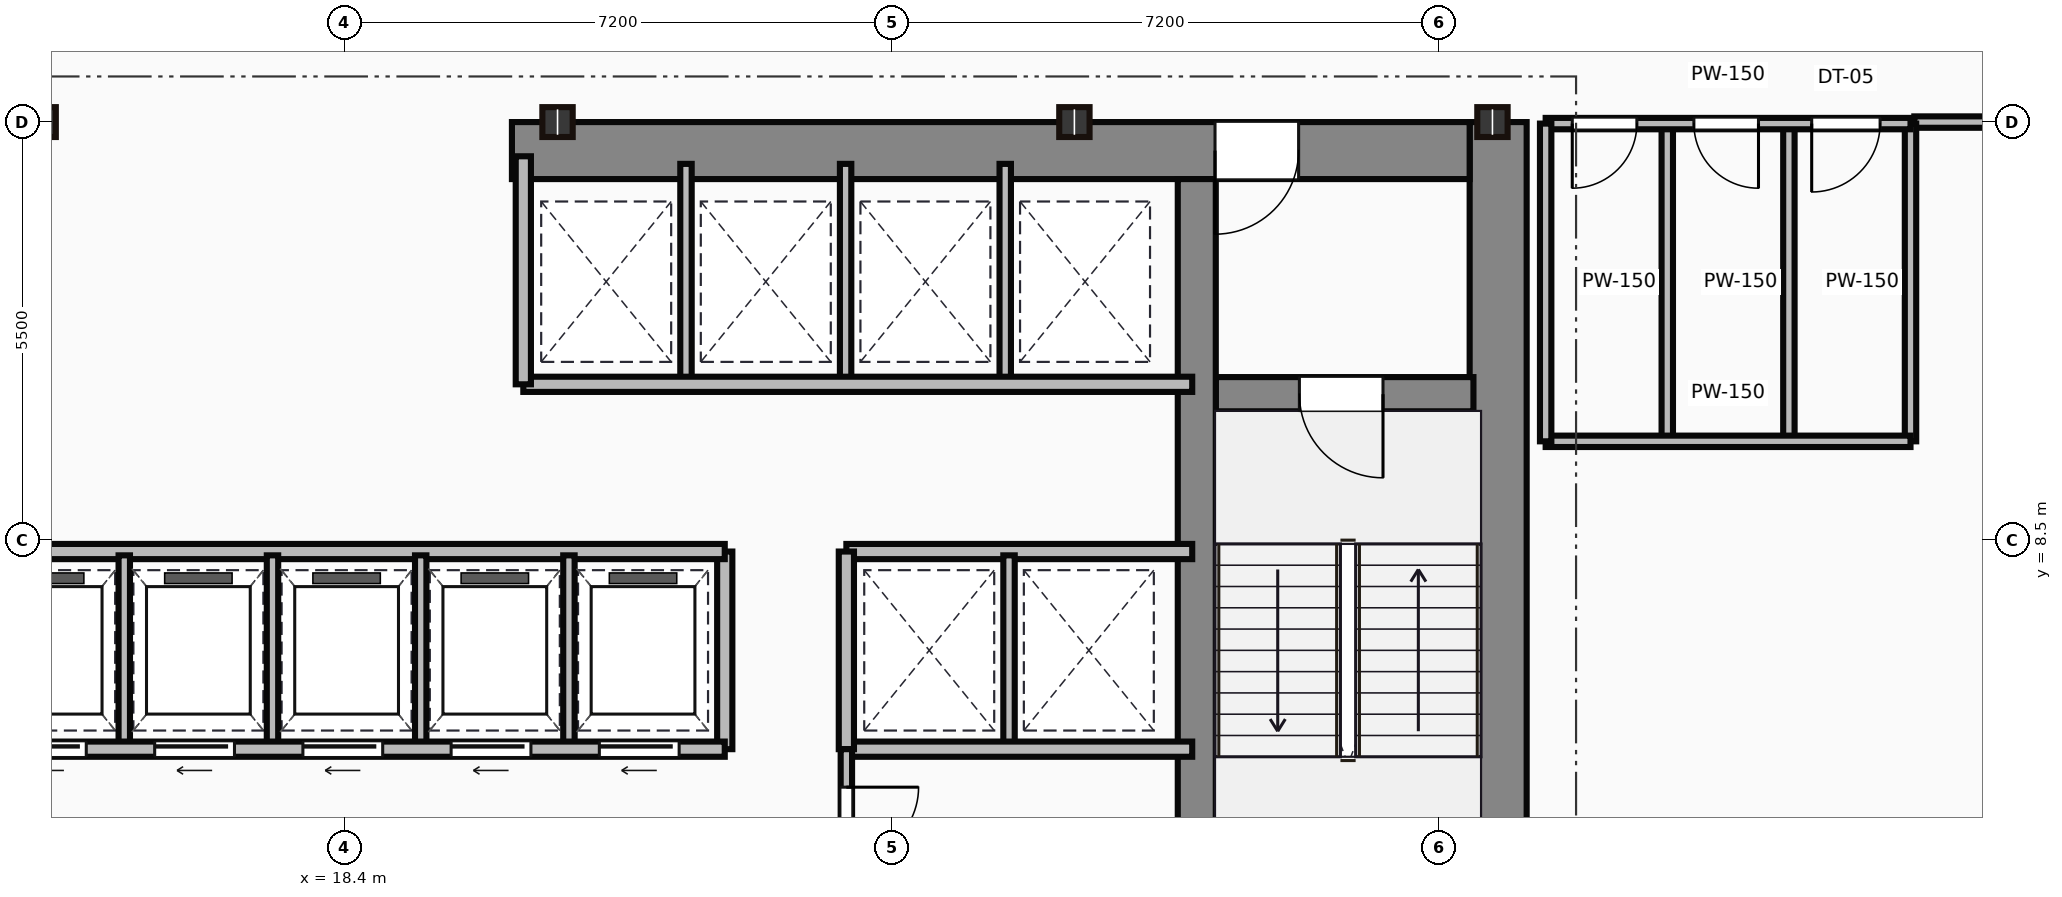
"""IFC4 building model, lengths in metres.
Left out: names, types, materials, properties, quantities, classifications, styles, units other than length and angle.
Written with IfcOpenShell. Run it as: python <this file> out.ifc"""

import sys

from ifc_helpers import new_model, si_unit, direction, frame, frame_2d, origin, origin_2d, place, context, subcontext, project, spatial, rectangle, i_section, extrude, source, transform, mapped, element, fill, save


model = new_model("IFC4")
c1 = context("Model", 3, precision=1e-05, world=origin(), true_north=direction((0.0, 1.0)))
c2 = subcontext(c1, "Body", "Model", "MODEL_VIEW")
j1 = project(units=[si_unit("LENGTHUNIT", "METRE"), si_unit("PLANEANGLEUNIT", "RADIAN")], contexts=[c1])
p1 = place(None, origin())
s1 = spatial("IfcSite", under=j1, at=p1, CompositionType="ELEMENT")
p2 = place(p1, origin())
s2 = spatial("IfcBuilding", under=s1, at=p2, CompositionType="ELEMENT")
p3 = place(p2, frame((0.0, 0.0, 110.55)))
s3 = spatial("IfcBuildingStorey", under=s2, at=p3, CompositionType="ELEMENT", Elevation=110.55)
m1 = source(origin(), c2, "Body", "SweptSolid", [
    extrude(rectangle(XDim=13.1, YDim=0.75, at=frame_2d((6.55, 0.0))), origin(), (0.0, 0.0, 1.0), 3.65),
])
p4 = place(p3, frame((33.575, 0.9, 0.0), z_axis=(0.0, 0.0, 1.0), x_axis=(0.0, 1.0, 0.0)))
e1 = element("IfcWall", 1, at=p4, inside=s3, PredefinedType="SHEAR", context=c2, shape_type="MappedRepresentation", body=[
    mapped(m1, transform((0.0, 0.0, 0.0))),
])
m2 = source(origin(), c2, "Body", "SweptSolid", [
    extrude(rectangle(XDim=12.6, YDim=0.75, at=frame_2d((6.3, 0.0))), origin(), (0.0, 0.0, 1.0), 3.65),
])
p5 = place(p3, frame((20.6, 13.625, 0.0), z_axis=(0.0, 0.0, 1.0), x_axis=(1.0, 0.0, 0.0)))
e2 = element("IfcWall", 2, at=p5, inside=s3, PredefinedType="SHEAR", context=c2, shape_type="MappedRepresentation", body=[
    mapped(m2, transform((0.0, 0.0, 0.0))),
])
p6 = place(p5, frame((9.25, 0.0, 0.0)))
e3 = element("IfcOpeningElement", 3, at=p6, cuts=e2, PredefinedType="OPENING", context=c2, shape_type="SweptSolid", body=[
    extrude(rectangle(XDim=1.1, YDim=2.15, at=frame_2d((0.55, 1.075))), frame((0.0, 0.385, 0.0), z_axis=(0.0, -1.0, 0.0), x_axis=(1.0, 0.0, 0.0)), (0.0, 0.0, 1.0), 0.77),
])
m3 = source(origin(), c2, "Body", "SweptSolid", [
    extrude(rectangle(XDim=12.35, YDim=0.5, at=frame_2d((6.175, 0.0))), origin(), (0.0, 0.0, 1.0), 3.65),
])
p7 = place(p3, frame((29.61, 0.9, 0.0), z_axis=(0.0, 0.0, 1.0), x_axis=(0.0, 1.0, 0.0)))
e4 = element("IfcWall", 4, at=p7, inside=s3, PredefinedType="SHEAR", context=c2, shape_type="MappedRepresentation", body=[
    mapped(m3, transform((0.0, 0.0, 0.0))),
])
m4 = source(origin(), c2, "Body", "SweptSolid", [
    extrude(rectangle(XDim=3.39, YDim=0.45, at=frame_2d((1.695, 0.0))), origin(), (0.0, 0.0, 1.0), 3.65),
])
p8 = place(p3, frame((29.86, 10.42, 0.0), z_axis=(0.0, 0.0, 1.0), x_axis=(1.0, 0.0, 0.0)))
e5 = element("IfcWall", 5, at=p8, inside=s3, PredefinedType="SHEAR", context=c2, shape_type="MappedRepresentation", body=[
    mapped(m4, transform((0.0, 0.0, 0.0))),
])
p9 = place(p8, frame((1.1, 0.0, 0.0)))
e6 = element("IfcOpeningElement", 6, at=p9, cuts=e5, PredefinedType="OPENING", context=c2, shape_type="SweptSolid", body=[
    extrude(rectangle(XDim=1.1, YDim=2.15, at=frame_2d((0.55, 1.075))), frame((0.0, 0.235, 0.0), z_axis=(0.0, -1.0, 0.0), x_axis=(1.0, 0.0, 0.0)), (0.0, 0.0, 1.0), 0.47),
])
m5 = source(origin(), c2, "Body", "SweptSolid", [
    extrude(i_section(OverallWidth=0.399, OverallDepth=0.393, WebThickness=0.023, FlangeThickness=0.037, at=origin_2d()), origin(), (0.0, 0.0, 1.0), 3.65),
])
for number, where, z_axis, x_axis in (
    (7, (14.4, 14.0, 0.0), (0.0, 0.0, 1.0), (1.0, 0.0, 0.0)),
    (8, (21.2, 14.0, 0.0), (0.0, 0.0, 1.0), (1.0, 0.0, 0.0)),
    (9, (28.0, 14.0, 0.0), (0.0, 0.0, 1.0), (1.0, 0.0, 0.0)),
    (10, (33.5, 14.0, 0.0), (0.0, 0.0, 1.0), (1.0, 0.0, 0.0)),
):
    element("IfcColumn", number, at=place(p3, frame(where, z_axis=z_axis, x_axis=x_axis)), inside=s3, PredefinedType="COLUMN", context=c2, shape_type="MappedRepresentation", body=[
        mapped(m5, transform((0.0, 0.0, 0.0))),
    ])
m6 = source(origin(), c2, "Body", "SweptSolid", [
    extrude(rectangle(XDim=11.85, YDim=0.2, at=frame_2d((5.925, 0.0))), origin(), (0.0, 0.0, 1.0), 3.4),
])
p10 = place(p3, frame((11.55, 5.75, 0.0), z_axis=(0.0, 0.0, 1.0), x_axis=(1.0, 0.0, 0.0)))
e11 = element("IfcWall", 11, at=p10, inside=s3, PredefinedType="PARTITIONING", context=c2, shape_type="MappedRepresentation", body=[
    mapped(m6, transform((0.0, 0.0, 0.0))),
])
p11 = place(p10, frame((0.45, 0.0, 0.0)))
e12 = element("IfcOpeningElement", 12, at=p11, cuts=e11, PredefinedType="OPENING", context=c2, shape_type="SweptSolid", body=[
    extrude(rectangle(XDim=1.05, YDim=2.15, at=frame_2d((0.525, 1.075))), frame((0.0, 0.11, 0.0), z_axis=(0.0, -1.0, 0.0), x_axis=(1.0, 0.0, 0.0)), (0.0, 0.0, 1.0), 0.22),
])
p12 = place(p10, frame((2.4, 0.0, 0.0)))
e13 = element("IfcOpeningElement", 13, at=p12, cuts=e11, PredefinedType="OPENING", context=c2, shape_type="SweptSolid", body=[
    extrude(rectangle(XDim=1.05, YDim=2.15, at=frame_2d((0.525, 1.075))), frame((0.0, 0.11, 0.0), z_axis=(0.0, -1.0, 0.0), x_axis=(1.0, 0.0, 0.0)), (0.0, 0.0, 1.0), 0.22),
])
p13 = place(p10, frame((4.35, 0.0, 0.0)))
e14 = element("IfcOpeningElement", 14, at=p13, cuts=e11, PredefinedType="OPENING", context=c2, shape_type="SweptSolid", body=[
    extrude(rectangle(XDim=1.05, YDim=2.15, at=frame_2d((0.525, 1.075))), frame((0.0, 0.11, 0.0), z_axis=(0.0, -1.0, 0.0), x_axis=(1.0, 0.0, 0.0)), (0.0, 0.0, 1.0), 0.22),
])
p14 = place(p10, frame((6.3, 0.0, 0.0)))
e15 = element("IfcOpeningElement", 15, at=p14, cuts=e11, PredefinedType="OPENING", context=c2, shape_type="SweptSolid", body=[
    extrude(rectangle(XDim=1.05, YDim=2.15, at=frame_2d((0.525, 1.075))), frame((0.0, 0.11, 0.0), z_axis=(0.0, -1.0, 0.0), x_axis=(1.0, 0.0, 0.0)), (0.0, 0.0, 1.0), 0.22),
])
p15 = place(p10, frame((8.25, 0.0, 0.0)))
e16 = element("IfcOpeningElement", 16, at=p15, cuts=e11, PredefinedType="OPENING", context=c2, shape_type="SweptSolid", body=[
    extrude(rectangle(XDim=1.05, YDim=2.15, at=frame_2d((0.525, 1.075))), frame((0.0, 0.11, 0.0), z_axis=(0.0, -1.0, 0.0), x_axis=(1.0, 0.0, 0.0)), (0.0, 0.0, 1.0), 0.22),
])
p16 = place(p10, frame((10.2, 0.0, 0.0)))
e17 = element("IfcOpeningElement", 17, at=p16, cuts=e11, PredefinedType="OPENING", context=c2, shape_type="SweptSolid", body=[
    extrude(rectangle(XDim=1.05, YDim=2.15, at=frame_2d((0.525, 1.075))), frame((0.0, 0.11, 0.0), z_axis=(0.0, -1.0, 0.0), x_axis=(1.0, 0.0, 0.0)), (0.0, 0.0, 1.0), 0.22),
])
p17 = place(p3, frame((11.55, 8.35, 0.0), z_axis=(0.0, 0.0, 1.0), x_axis=(1.0, 0.0, 0.0)))
e18 = element("IfcWall", 18, at=p17, inside=s3, PredefinedType="PARTITIONING", context=c2, shape_type="MappedRepresentation", body=[
    mapped(m6, transform((0.0, 0.0, 0.0))),
])
m7 = source(origin(), c2, "Body", "SweptSolid", [
    extrude(rectangle(XDim=2.6, YDim=0.2, at=frame_2d((1.3, 0.0))), origin(), (0.0, 0.0, 1.0), 3.4),
])
p18 = place(p3, frame((23.4, 5.75, 0.0), z_axis=(0.0, 0.0, 1.0), x_axis=(0.0, 1.0, 0.0)))
e19 = element("IfcWall", 19, at=p18, inside=s3, PredefinedType="PARTITIONING", context=c2, shape_type="MappedRepresentation", body=[
    mapped(m7, transform((0.0, 0.0, 0.0))),
])
m8 = source(origin(), c2, "Body", "SweptSolid", [
    extrude(rectangle(XDim=2.5, YDim=0.15, at=frame_2d((1.25, 0.0))), origin(), (0.0, 0.0, 1.0), 3.4),
])
for number, where, z_axis, x_axis in (
    (20, (15.5, 5.8, 0.0), (0.0, 0.0, 1.0), (0.0, 1.0, 0.0)),
    (21, (17.45, 5.8, 0.0), (0.0, 0.0, 1.0), (0.0, 1.0, 0.0)),
    (22, (19.4, 5.8, 0.0), (0.0, 0.0, 1.0), (0.0, 1.0, 0.0)),
    (23, (21.35, 5.8, 0.0), (0.0, 0.0, 1.0), (0.0, 1.0, 0.0)),
):
    element("IfcWall", number, at=place(p3, frame(where, z_axis=z_axis, x_axis=x_axis)), inside=s3, PredefinedType="PARTITIONING", context=c2, shape_type="MappedRepresentation", body=[
        mapped(m8, transform((0.0, 0.0, 0.0))),
    ])
m9 = source(origin(), c2, "Body", "SweptSolid", [
    extrude(rectangle(XDim=8.8, YDim=0.2, at=frame_2d((4.4, 0.0))), origin(), (0.0, 0.0, 1.0), 3.4),
])
p19 = place(p3, frame((20.75, 10.55, 0.0), z_axis=(0.0, 0.0, 1.0), x_axis=(1.0, 0.0, 0.0)))
e24 = element("IfcWall", 24, at=p19, inside=s3, PredefinedType="PARTITIONING", context=c2, shape_type="MappedRepresentation", body=[
    mapped(m9, transform((0.0, 0.0, 0.0))),
])
m10 = source(origin(), c2, "Body", "SweptSolid", [
    extrude(rectangle(XDim=3.0, YDim=0.2, at=frame_2d((1.5, 0.0))), origin(), (0.0, 0.0, 1.0), 3.4),
])
p20 = place(p3, frame((20.75, 10.55, 0.0), z_axis=(0.0, 0.0, 1.0), x_axis=(0.0, 1.0, 0.0)))
e25 = element("IfcWall", 25, at=p20, inside=s3, PredefinedType="PARTITIONING", context=c2, shape_type="MappedRepresentation", body=[
    mapped(m10, transform((0.0, 0.0, 0.0))),
])
m11 = source(origin(), c2, "Body", "SweptSolid", [
    extrude(rectangle(XDim=2.85, YDim=0.15, at=frame_2d((1.425, 0.0))), origin(), (0.0, 0.0, 1.0), 3.4),
])
for number, where, z_axis, x_axis in (
    (26, (22.89, 10.6, 0.0), (0.0, 0.0, 1.0), (0.0, 1.0, 0.0)),
    (27, (24.99, 10.6, 0.0), (0.0, 0.0, 1.0), (0.0, 1.0, 0.0)),
    (28, (27.09, 10.6, 0.0), (0.0, 0.0, 1.0), (0.0, 1.0, 0.0)),
):
    element("IfcWall", number, at=place(p3, frame(where, z_axis=z_axis, x_axis=x_axis)), inside=s3, PredefinedType="PARTITIONING", context=c2, shape_type="MappedRepresentation", body=[
        mapped(m11, transform((0.0, 0.0, 0.0))),
    ])
m12 = source(origin(), c2, "Body", "SweptSolid", [
    extrude(rectangle(XDim=4.55, YDim=0.2, at=frame_2d((2.275, 0.0))), origin(), (0.0, 0.0, 1.0), 3.4),
])
for number, where, z_axis, x_axis in (
    (29, (25.0, 8.35, 0.0), (0.0, 0.0, 1.0), (1.0, 0.0, 0.0)),
    (30, (25.0, 5.75, 0.0), (0.0, 0.0, 1.0), (1.0, 0.0, 0.0)),
):
    element("IfcWall", number, at=place(p3, frame(where, z_axis=z_axis, x_axis=x_axis)), inside=s3, PredefinedType="PARTITIONING", context=c2, shape_type="MappedRepresentation", body=[
        mapped(m12, transform((0.0, 0.0, 0.0))),
    ])
p21 = place(p3, frame((25.0, 5.75, 0.0), z_axis=(0.0, 0.0, 1.0), x_axis=(0.0, 1.0, 0.0)))
e31 = element("IfcWall", 31, at=p21, inside=s3, PredefinedType="PARTITIONING", context=c2, shape_type="MappedRepresentation", body=[
    mapped(m7, transform((0.0, 0.0, 0.0))),
])
p22 = place(p3, frame((27.14, 5.8, 0.0), z_axis=(0.0, 0.0, 1.0), x_axis=(0.0, 1.0, 0.0)))
e32 = element("IfcWall", 32, at=p22, inside=s3, PredefinedType="PARTITIONING", context=c2, shape_type="MappedRepresentation", body=[
    mapped(m8, transform((0.0, 0.0, 0.0))),
])
m13 = source(origin(), c2, "Body", "SweptSolid", [
    extrude(rectangle(XDim=4.9, YDim=0.15, at=frame_2d((2.45, 0.0))), origin(), (0.0, 0.0, 1.0), 3.4),
])
p23 = place(p3, frame((25.0, 0.85, 0.0), z_axis=(0.0, 0.0, 1.0), x_axis=(0.0, 1.0, 0.0)))
e33 = element("IfcWall", 33, at=p23, inside=s3, PredefinedType="PARTITIONING", context=c2, shape_type="MappedRepresentation", body=[
    mapped(m13, transform((0.0, 0.0, 0.0))),
])
p24 = place(p23, frame((1.8, 0.0, 0.0)))
e34 = element("IfcOpeningElement", 34, at=p24, cuts=e33, PredefinedType="OPENING", context=c2, shape_type="SweptSolid", body=[
    extrude(rectangle(XDim=0.95, YDim=2.15, at=frame_2d((0.475, 1.075))), frame((0.0, 0.085, 0.0), z_axis=(0.0, -1.0, 0.0), x_axis=(1.0, 0.0, 0.0)), (0.0, 0.0, 1.0), 0.17),
])
p25 = place(p23, frame((3.45, 0.0, 0.0)))
e35 = element("IfcOpeningElement", 35, at=p25, cuts=e33, PredefinedType="OPENING", context=c2, shape_type="SweptSolid", body=[
    extrude(rectangle(XDim=0.95, YDim=2.15, at=frame_2d((0.475, 1.075))), frame((0.0, 0.085, 0.0), z_axis=(0.0, -1.0, 0.0), x_axis=(1.0, 0.0, 0.0)), (0.0, 0.0, 1.0), 0.17),
])
m14 = source(origin(), c2, "Body", "SweptSolid", [
    extrude(rectangle(XDim=4.8, YDim=0.15, at=frame_2d((2.4, 0.0))), origin(), (0.0, 0.0, 1.0), 2.702),
])
p26 = place(p3, frame((34.2, 13.98, 0.0), z_axis=(0.0, 0.0, 1.0), x_axis=(1.0, 0.0, 0.0)))
e36 = element("IfcWall", 36, at=p26, inside=s3, PredefinedType="PARTITIONING", context=c2, shape_type="MappedRepresentation", body=[
    mapped(m14, transform((0.0, 0.0, 0.0))),
])
p27 = place(p26, frame((0.35, 0.0, 0.0)))
e37 = element("IfcOpeningElement", 37, at=p27, cuts=e36, PredefinedType="OPENING", context=c2, shape_type="SweptSolid", body=[
    extrude(rectangle(XDim=0.85, YDim=2.1, at=frame_2d((0.425, 1.05))), frame((0.0, 0.085, 0.0), z_axis=(0.0, -1.0, 0.0), x_axis=(1.0, 0.0, 0.0)), (0.0, 0.0, 1.0), 0.17),
])
p28 = place(p26, frame((1.95, 0.0, 0.0)))
e38 = element("IfcOpeningElement", 38, at=p28, cuts=e36, PredefinedType="OPENING", context=c2, shape_type="SweptSolid", body=[
    extrude(rectangle(XDim=0.85, YDim=2.1, at=frame_2d((0.425, 1.05))), frame((0.0, 0.085, 0.0), z_axis=(0.0, -1.0, 0.0), x_axis=(1.0, 0.0, 0.0)), (0.0, 0.0, 1.0), 0.17),
])
p29 = place(p26, frame((3.5, 0.0, 0.0)))
e39 = element("IfcOpeningElement", 39, at=p29, cuts=e36, PredefinedType="OPENING", context=c2, shape_type="SweptSolid", body=[
    extrude(rectangle(XDim=0.9, YDim=2.1, at=frame_2d((0.45, 1.05))), frame((0.0, 0.085, 0.0), z_axis=(0.0, -1.0, 0.0), x_axis=(1.0, 0.0, 0.0)), (0.0, 0.0, 1.0), 0.17),
])
m15 = source(origin(), c2, "Body", "SweptSolid", [
    extrude(rectangle(XDim=4.8, YDim=0.15, at=frame_2d((2.4, 0.0))), origin(), (0.0, 0.0, 1.0), 3.4),
])
p30 = place(p3, frame((34.2, 9.8, 0.0), z_axis=(0.0, 0.0, 1.0), x_axis=(1.0, 0.0, 0.0)))
e40 = element("IfcWall", 40, at=p30, inside=s3, PredefinedType="PARTITIONING", context=c2, shape_type="MappedRepresentation", body=[
    mapped(m15, transform((0.0, 0.0, 0.0))),
])
m16 = source(origin(), c2, "Body", "SweptSolid", [
    extrude(rectangle(XDim=4.18, YDim=0.15, at=frame_2d((2.09, 0.0))), origin(), (0.0, 0.0, 1.0), 3.4),
])
for number, where, z_axis, x_axis in (
    (41, (39.0, 9.8, 0.0), (0.0, 0.0, 1.0), (0.0, 1.0, 0.0)),
    (42, (34.2, 9.8, 0.0), (0.0, 0.0, 1.0), (0.0, 1.0, 0.0)),
    (43, (35.8, 9.8, 0.0), (0.0, 0.0, 1.0), (0.0, 1.0, 0.0)),
    (44, (37.4, 9.8, 0.0), (0.0, 0.0, 1.0), (0.0, 1.0, 0.0)),
):
    element("IfcWall", number, at=place(p3, frame(where, z_axis=z_axis, x_axis=x_axis)), inside=s3, PredefinedType="PARTITIONING", context=c2, shape_type="MappedRepresentation", body=[
        mapped(m16, transform((0.0, 0.0, 0.0))),
    ])
m17 = source(origin(), c2, "Body", "SweptSolid", [
    extrude(rectangle(XDim=1.75, YDim=0.15, at=frame_2d((0.875, 0.0))), origin(), (0.0, 0.0, 1.0), 2.702),
])
p31 = place(p3, frame((40.8, 14.0, 0.0), z_axis=(0.0, 0.0, 1.0), x_axis=(-1.0, 0.0, 0.0)))
e45 = element("IfcWall", 45, at=p31, inside=s3, PredefinedType="PARTITIONING", context=c2, shape_type="MappedRepresentation", body=[
    mapped(m17, transform((0.0, 0.0, 0.0))),
])
m18 = source(origin(), c2, "Body", "SweptSolid", [
    extrude(rectangle(XDim=1.1, YDim=2.15, at=frame_2d((0.55, 1.075))), frame((0.0, 0.025, 0.0), z_axis=(0.0, -1.0, 0.0), x_axis=(1.0, 0.0, 0.0)), (0.0, 0.0, 1.0), 0.05),
])
p32 = place(p9, frame((1.1, 0.0, 0.0), z_axis=(0.0, 0.0, 1.0), x_axis=(-1.0, 0.0, 0.0)))
e46 = element("IfcDoor", 46, at=p32, inside=s3, OperationType="SINGLE_SWING_RIGHT", PredefinedType="DOOR", context=c2, shape_type="MappedRepresentation", body=[
    mapped(m18, transform((0.0, 0.0, 0.0))),
])
fill(e6, e46)
p33 = place(p6, origin())
e47 = element("IfcDoor", 47, at=p33, inside=s3, OperationType="SINGLE_SWING_LEFT", PredefinedType="DOOR", context=c2, shape_type="MappedRepresentation", body=[
    mapped(m18, transform((0.0, 0.0, 0.0))),
])
fill(e3, e47)
m19 = source(origin(), c2, "Body", "SweptSolid", [
    extrude(rectangle(XDim=1.05, YDim=2.15, at=frame_2d((0.525, 1.075))), frame((0.0, 0.025, 0.0), z_axis=(0.0, -1.0, 0.0), x_axis=(1.0, 0.0, 0.0)), (0.0, 0.0, 1.0), 0.05),
])
p34 = place(p12, frame((1.05, 0.0, 0.0), z_axis=(0.0, 0.0, 1.0), x_axis=(-1.0, 0.0, 0.0)))
e48 = element("IfcDoor", 48, at=p34, inside=s3, OperationType="SLIDING_TO_LEFT", PredefinedType="DOOR", context=c2, shape_type="MappedRepresentation", body=[
    mapped(m19, transform((0.0, 0.0, 0.0))),
])
fill(e13, e48)
p35 = place(p13, frame((1.05, 0.0, 0.0), z_axis=(0.0, 0.0, 1.0), x_axis=(-1.0, 0.0, 0.0)))
e49 = element("IfcDoor", 49, at=p35, inside=s3, OperationType="SLIDING_TO_LEFT", PredefinedType="DOOR", context=c2, shape_type="MappedRepresentation", body=[
    mapped(m19, transform((0.0, 0.0, 0.0))),
])
fill(e14, e49)
p36 = place(p14, frame((1.05, 0.0, 0.0), z_axis=(0.0, 0.0, 1.0), x_axis=(-1.0, 0.0, 0.0)))
e50 = element("IfcDoor", 50, at=p36, inside=s3, OperationType="SLIDING_TO_LEFT", PredefinedType="DOOR", context=c2, shape_type="MappedRepresentation", body=[
    mapped(m19, transform((0.0, 0.0, 0.0))),
])
fill(e15, e50)
p37 = place(p15, frame((1.05, 0.0, 0.0), z_axis=(0.0, 0.0, 1.0), x_axis=(-1.0, 0.0, 0.0)))
e51 = element("IfcDoor", 51, at=p37, inside=s3, OperationType="SLIDING_TO_LEFT", PredefinedType="DOOR", context=c2, shape_type="MappedRepresentation", body=[
    mapped(m19, transform((0.0, 0.0, 0.0))),
])
fill(e16, e51)
p38 = place(p16, frame((1.05, 0.0, 0.0), z_axis=(0.0, 0.0, 1.0), x_axis=(-1.0, 0.0, 0.0)))
e52 = element("IfcDoor", 52, at=p38, inside=s3, OperationType="SLIDING_TO_LEFT", PredefinedType="DOOR", context=c2, shape_type="MappedRepresentation", body=[
    mapped(m19, transform((0.0, 0.0, 0.0))),
])
fill(e17, e52)
m20 = source(origin(), c2, "Body", "SweptSolid", [
    extrude(rectangle(XDim=0.95, YDim=2.15, at=frame_2d((0.475, 1.075))), frame((0.0, 0.025, 0.0), z_axis=(0.0, -1.0, 0.0), x_axis=(1.0, 0.0, 0.0)), (0.0, 0.0, 1.0), 0.05),
])
p39 = place(p25, origin())
e53 = element("IfcDoor", 53, at=p39, inside=s3, OperationType="SINGLE_SWING_RIGHT", PredefinedType="DOOR", context=c2, shape_type="MappedRepresentation", body=[
    mapped(m20, transform((0.0, 0.0, 0.0))),
])
fill(e35, e53)
m21 = source(origin(), c2, "Body", "SweptSolid", [
    extrude(rectangle(XDim=0.85, YDim=2.1, at=frame_2d((0.425, 1.05))), frame((0.0, 0.025, 0.0), z_axis=(0.0, -1.0, 0.0), x_axis=(1.0, 0.0, 0.0)), (0.0, 0.0, 1.0), 0.05),
])
p40 = place(p27, frame((0.85, 0.0, 0.0), z_axis=(0.0, 0.0, 1.0), x_axis=(-1.0, 0.0, 0.0)))
e54 = element("IfcDoor", 54, at=p40, inside=s3, OperationType="SINGLE_SWING_LEFT", PredefinedType="DOOR", context=c2, shape_type="MappedRepresentation", body=[
    mapped(m21, transform((0.0, 0.0, 0.0))),
])
fill(e37, e54)
p41 = place(p28, frame((0.85, 0.0, 0.0), z_axis=(0.0, 0.0, 1.0), x_axis=(-1.0, 0.0, 0.0)))
e55 = element("IfcDoor", 55, at=p41, inside=s3, OperationType="SINGLE_SWING_RIGHT", PredefinedType="DOOR", context=c2, shape_type="MappedRepresentation", body=[
    mapped(m21, transform((0.0, 0.0, 0.0))),
])
fill(e38, e55)
m22 = source(origin(), c2, "Body", "SweptSolid", [
    extrude(rectangle(XDim=0.9, YDim=2.1, at=frame_2d((0.45, 1.05))), frame((0.0, 0.025, 0.0), z_axis=(0.0, -1.0, 0.0), x_axis=(1.0, 0.0, 0.0)), (0.0, 0.0, 1.0), 0.05),
])
p42 = place(p29, frame((0.9, 0.0, 0.0), z_axis=(0.0, 0.0, 1.0), x_axis=(-1.0, 0.0, 0.0)))
e56 = element("IfcDoor", 56, at=p42, inside=s3, OperationType="SINGLE_SWING_LEFT", PredefinedType="DOOR", context=c2, shape_type="MappedRepresentation", body=[
    mapped(m22, transform((0.0, 0.0, 0.0))),
])
fill(e39, e56)
save(model, sys.argv[1])
